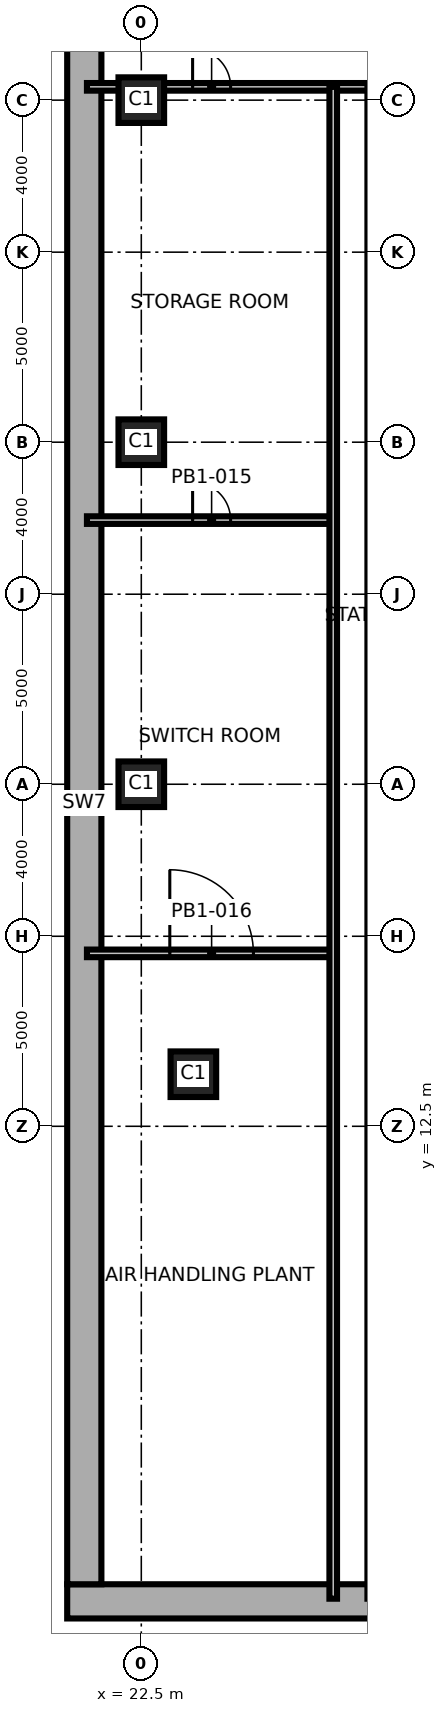
"""IFC4 building model, lengths in metres.
Left out: names, types, materials, properties, quantities, classifications, styles, units other than length and angle.
Written with IfcOpenShell. Run it as: python <this file> out.ifc"""

import sys

from ifc_helpers import new_model, si_unit, direction, frame, frame_2d, origin, origin_2d, place, context, subcontext, project, spatial, rectangle, extrude, element, fill, save


model = new_model("IFC4")
c1 = context("Model", 3, precision=1e-05, world=origin(), true_north=direction((0.0, 1.0)))
c2 = subcontext(c1, "Body", "Model", "MODEL_VIEW")
j1 = project(units=[si_unit("LENGTHUNIT", "METRE"), si_unit("PLANEANGLEUNIT", "RADIAN")], contexts=[c1])
p1 = place(None, origin())
s1 = spatial("IfcSite", under=j1, at=p1, CompositionType="ELEMENT")
p2 = place(p1, origin())
s2 = spatial("IfcBuilding", under=s1, at=p2, CompositionType="ELEMENT")
p3 = place(p2, frame((0.0, 0.0, -4.5)))
s3 = spatial("IfcBuildingStorey", under=s2, at=p3, CompositionType="ELEMENT", Elevation=-4.5)
for number, where, z_axis, x_axis in (
    (1, (23.87, 13.87, 0.0), (0.0, 0.0, 1.0), (1.0, 0.0, 0.0)),
    (2, (22.5, 21.5, 0.0), (0.0, 0.0, 1.0), (1.0, 0.0, 0.0)),
    (3, (22.5, 30.5, 0.0), (0.0, 0.0, 1.0), (1.0, 0.0, 0.0)),
    (4, (22.5, 39.5, 0.0), (0.0, 0.0, 1.0), (1.0, 0.0, 0.0)),
):
    element("IfcColumn", number, at=place(p3, frame(where, z_axis=z_axis, x_axis=x_axis)), inside=s3, PredefinedType="COLUMN", context=c2, shape_type="SweptSolid", body=[
        extrude(rectangle(XDim=1.2, YDim=1.2, at=origin_2d()), origin(), (0.0, 0.0, 1.0), 4.5),
    ])
p4 = place(p3, frame((20.55, 0.0, 0.0), z_axis=(0.0, 0.0, 1.0), x_axis=(1.0, 0.0, 0.0)))
e5 = element("IfcWall", 5, at=p4, inside=s3, PredefinedType="SOLIDWALL", context=c2, shape_type="SweptSolid", body=[
    extrude(rectangle(XDim=84.9, YDim=0.9, at=frame_2d((42.45, 0.0))), origin(), (0.0, 0.0, 1.0), 4.5),
])
p5 = place(p3, frame((21.0, 41.55, 0.0), z_axis=(0.0, 0.0, 1.0), x_axis=(0.0, -1.0, 0.0)))
e6 = element("IfcWall", 6, at=p5, inside=s3, PredefinedType="SOLIDWALL", context=c2, shape_type="SweptSolid", body=[
    extrude(rectangle(XDim=41.1, YDim=0.9, at=frame_2d((20.55, 0.0))), origin(), (0.0, 0.0, 1.0), 4.5),
])
p6 = place(p3, frame((21.07, 17.05, 0.0), z_axis=(0.0, 0.0, 1.0), x_axis=(1.0, 0.0, 0.0)))
e7 = element("IfcWall", 7, at=p6, inside=s3, PredefinedType="PARTITIONING", context=c2, shape_type="SweptSolid", body=[
    extrude(rectangle(XDim=6.48, YDim=0.2, at=frame_2d((3.24, 0.0))), origin(), (0.0, 0.0, 1.0), 4.2),
])
p7 = place(p6, frame((2.18, 0.0, 0.0)))
e8 = element("IfcOpeningElement", 8, at=p7, cuts=e7, PredefinedType="OPENING", context=c2, shape_type="SweptSolid", body=[
    extrude(rectangle(XDim=2.2, YDim=2.4, at=frame_2d((1.1, 1.2))), frame((0.0, 0.11, 0.0), z_axis=(0.0, -1.0, 0.0), x_axis=(1.0, 0.0, 0.0)), (0.0, 0.0, 1.0), 0.22),
])
p8 = place(p3, frame((21.07, 28.45, 0.0), z_axis=(0.0, 0.0, 1.0), x_axis=(1.0, 0.0, 0.0)))
e9 = element("IfcWall", 9, at=p8, inside=s3, PredefinedType="PARTITIONING", context=c2, shape_type="SweptSolid", body=[
    extrude(rectangle(XDim=6.48, YDim=0.2, at=frame_2d((3.24, 0.0))), origin(), (0.0, 0.0, 1.0), 4.2),
])
p9 = place(p8, frame((2.78, 0.0, 0.0)))
e10 = element("IfcOpeningElement", 10, at=p9, cuts=e9, PredefinedType="OPENING", context=c2, shape_type="SweptSolid", body=[
    extrude(rectangle(XDim=1.0, YDim=2.1, at=frame_2d((0.5, 1.05))), frame((0.0, 0.11, 0.0), z_axis=(0.0, -1.0, 0.0), x_axis=(1.0, 0.0, 0.0)), (0.0, 0.0, 1.0), 0.22),
])
p10 = place(p3, frame((21.07, 39.85, 0.0), z_axis=(0.0, 0.0, 1.0), x_axis=(1.0, 0.0, 0.0)))
e11 = element("IfcWall", 11, at=p10, inside=s3, PredefinedType="PARTITIONING", context=c2, shape_type="SweptSolid", body=[
    extrude(rectangle(XDim=7.48, YDim=0.2, at=frame_2d((3.74, 0.0))), origin(), (0.0, 0.0, 1.0), 4.2),
])
p11 = place(p10, frame((2.78, 0.0, 0.0)))
e12 = element("IfcOpeningElement", 12, at=p11, cuts=e11, PredefinedType="OPENING", context=c2, shape_type="SweptSolid", body=[
    extrude(rectangle(XDim=1.0, YDim=2.1, at=frame_2d((0.5, 1.05))), frame((0.0, 0.11, 0.0), z_axis=(0.0, -1.0, 0.0), x_axis=(1.0, 0.0, 0.0)), (0.0, 0.0, 1.0), 0.22),
])
p12 = place(p3, frame((27.55, 0.07, 0.0), z_axis=(0.0, 0.0, 1.0), x_axis=(0.0, 1.0, 0.0)))
e13 = element("IfcWall", 13, at=p12, inside=s3, PredefinedType="PARTITIONING", context=c2, shape_type="SweptSolid", body=[
    extrude(rectangle(XDim=39.78, YDim=0.2, at=frame_2d((19.89, 0.0))), origin(), (0.0, 0.0, 1.0), 3.8),
])
p13 = place(p11, origin())
e14 = element("IfcDoor", 14, at=p13, inside=s3, OperationType="SINGLE_SWING_LEFT", PredefinedType="DOOR", context=c2, shape_type="SweptSolid", body=[
    extrude(rectangle(XDim=1.0, YDim=2.1, at=frame_2d((0.5, 1.05))), frame((0.0, 0.025, 0.0), z_axis=(0.0, -1.0, 0.0), x_axis=(1.0, 0.0, 0.0)), (0.0, 0.0, 1.0), 0.05),
])
fill(e12, e14)
p14 = place(p9, origin())
e15 = element("IfcDoor", 15, at=p14, inside=s3, OperationType="SINGLE_SWING_LEFT", PredefinedType="DOOR", context=c2, shape_type="SweptSolid", body=[
    extrude(rectangle(XDim=1.0, YDim=2.1, at=frame_2d((0.5, 1.05))), frame((0.0, 0.025, 0.0), z_axis=(0.0, -1.0, 0.0), x_axis=(1.0, 0.0, 0.0)), (0.0, 0.0, 1.0), 0.05),
])
fill(e10, e15)
p15 = place(p7, origin())
e16 = element("IfcDoor", 16, at=p15, inside=s3, OperationType="SINGLE_SWING_RIGHT", PredefinedType="DOOR", context=c2, shape_type="SweptSolid", body=[
    extrude(rectangle(XDim=2.2, YDim=2.4, at=frame_2d((1.1, 1.2))), frame((0.0, 0.025, 0.0), z_axis=(0.0, -1.0, 0.0), x_axis=(1.0, 0.0, 0.0)), (0.0, 0.0, 1.0), 0.05),
])
fill(e8, e16)
save(model, sys.argv[1])
